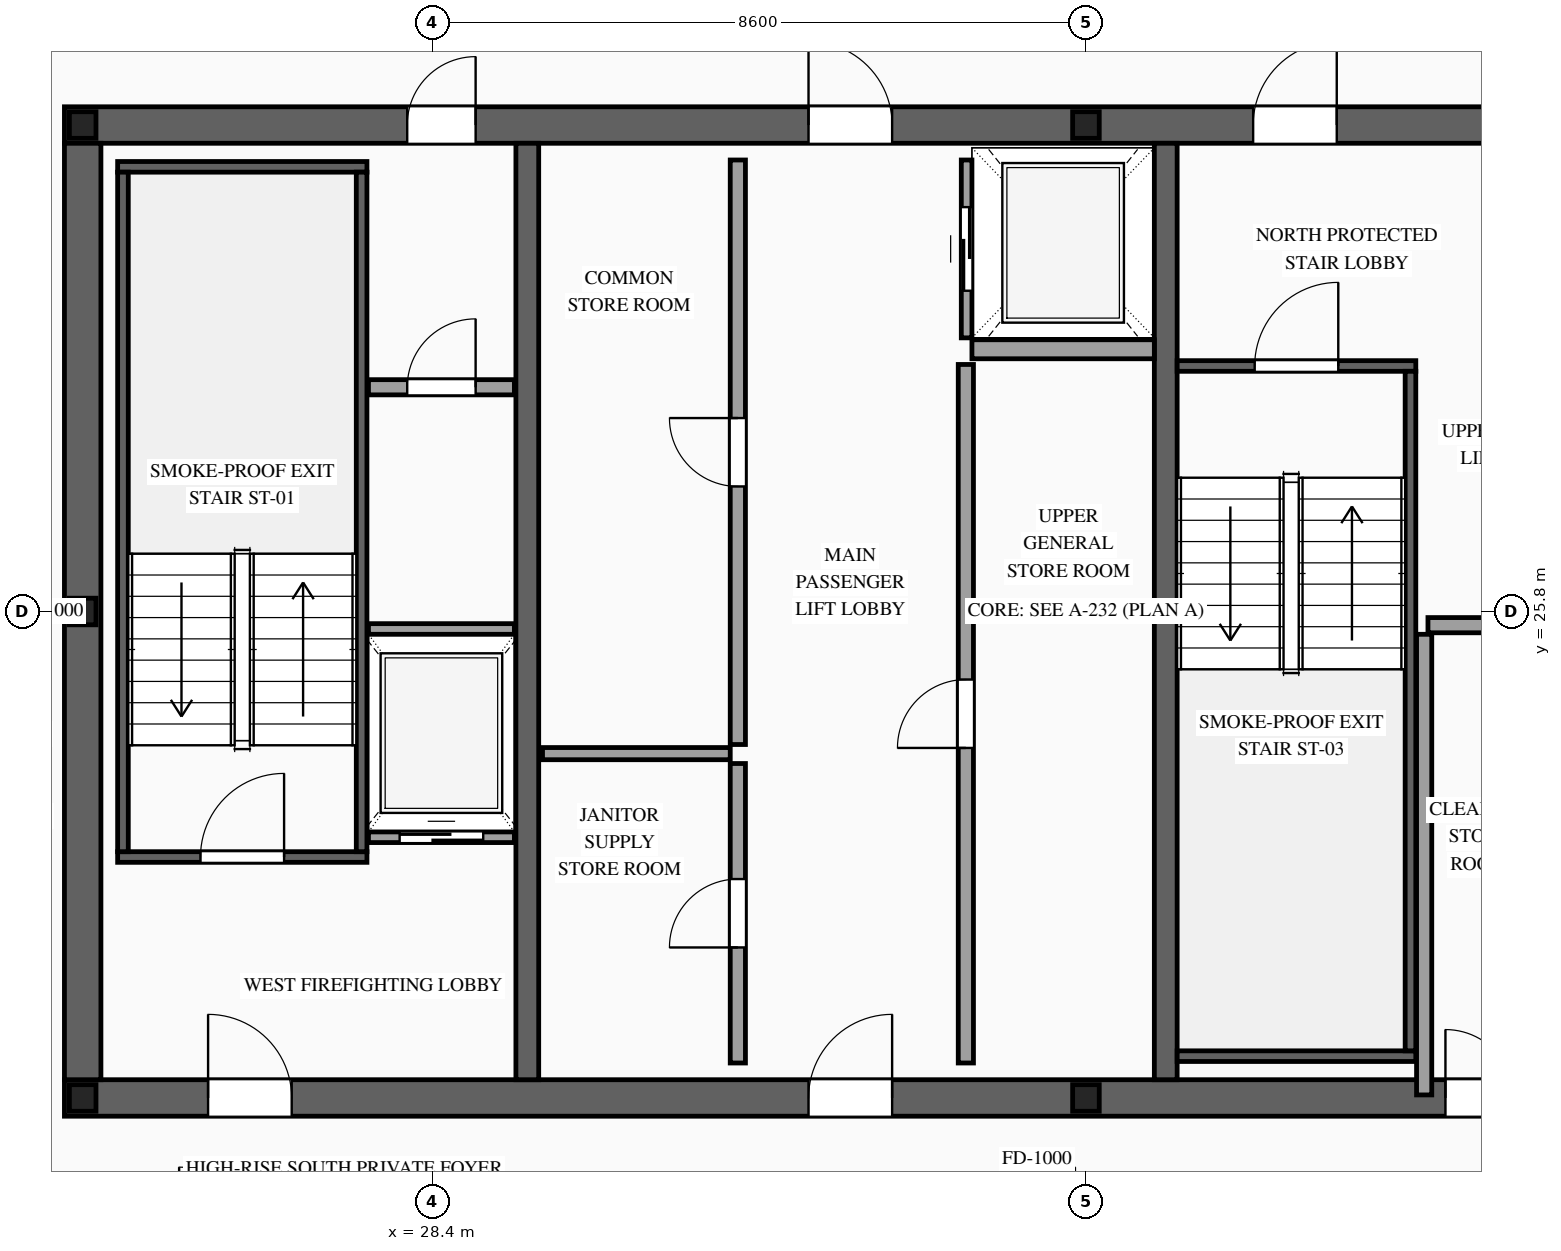
"""IFC4 building model, lengths in metres.
Left out: names, types, materials, properties, quantities, classifications, styles, units other than length and angle.
Written with IfcOpenShell. Run it as: python <this file> out.ifc"""

import sys

from ifc_helpers import new_model, si_unit, direction, frame, frame_2d, origin, origin_2d, place, context, subcontext, project, spatial, rectangle, i_section, extrude, source, transform, mapped, element, fill, save


model = new_model("IFC4")
c1 = context("Model", 3, precision=1e-05, world=origin(), true_north=direction((0.0, 1.0)))
c2 = subcontext(c1, "Body", "Model", "MODEL_VIEW")
j1 = project(units=[si_unit("LENGTHUNIT", "METRE"), si_unit("PLANEANGLEUNIT", "RADIAN")], contexts=[c1])
p1 = place(None, origin())
s1 = spatial("IfcSite", under=j1, at=p1, CompositionType="ELEMENT")
p2 = place(p1, origin())
s2 = spatial("IfcBuilding", under=s1, at=p2, CompositionType="ELEMENT")
p3 = place(p2, frame((0.0, 0.0, 289.1)))
s3 = spatial("IfcBuildingStorey", under=s2, at=p3, CompositionType="ELEMENT", Elevation=289.1)
p4 = place(p3, frame((23.56, 19.4, 0.0), z_axis=(0.0, 0.0, 1.0), x_axis=(1.0, 0.0, 0.0)))
e1 = element("IfcWall", 1, at=p4, inside=s3, PredefinedType="SHEAR", context=c2, shape_type="SweptSolid", body=[
    extrude(rectangle(XDim=26.88, YDim=0.48, at=frame_2d((13.44, 0.0))), origin(), (0.0, 0.0, 1.0), 3.5),
])
p5 = place(p4, frame((1.89, 0.0, 0.0)))
e2 = element("IfcOpeningElement", 2, at=p5, cuts=e1, PredefinedType="OPENING", context=c2, shape_type="SweptSolid", body=[
    extrude(rectangle(XDim=1.1, YDim=2.2, at=frame_2d((0.55, 1.1))), frame((0.0, 0.255, 0.0), z_axis=(0.0, -1.0, 0.0), x_axis=(1.0, 0.0, 0.0)), (0.0, 0.0, 1.0), 0.51),
])
p6 = place(p4, frame((9.79, 0.0, 0.0)))
e3 = element("IfcOpeningElement", 3, at=p6, cuts=e1, PredefinedType="OPENING", context=c2, shape_type="SweptSolid", body=[
    extrude(rectangle(XDim=1.1, YDim=2.2, at=frame_2d((0.55, 1.1))), frame((0.0, 0.255, 0.0), z_axis=(0.0, -1.0, 0.0), x_axis=(1.0, 0.0, 0.0)), (0.0, 0.0, 1.0), 0.51),
])
p7 = place(p4, frame((22.99, 0.0, 0.0)))
e4 = element("IfcOpeningElement", 4, at=p7, cuts=e1, PredefinedType="OPENING", context=c2, shape_type="SweptSolid", body=[
    extrude(rectangle(XDim=1.1, YDim=2.2, at=frame_2d((0.55, 1.1))), frame((0.0, 0.255, 0.0), z_axis=(0.0, -1.0, 0.0), x_axis=(1.0, 0.0, 0.0)), (0.0, 0.0, 1.0), 0.51),
])
p8 = place(p4, frame((19.61, 0.0, 0.0)))
e5 = element("IfcOpeningElement", 5, at=p8, cuts=e1, PredefinedType="OPENING", context=c2, shape_type="SweptSolid", body=[
    extrude(rectangle(XDim=0.9, YDim=2.15, at=frame_2d((0.45, 1.075))), frame((0.0, 0.255, 0.0), z_axis=(0.0, -1.0, 0.0), x_axis=(1.0, 0.0, 0.0)), (0.0, 0.0, 1.0), 0.51),
])
p9 = place(p4, frame((18.17, 0.0, 0.0)))
e6 = element("IfcOpeningElement", 6, at=p9, cuts=e1, PredefinedType="OPENING", context=c2, shape_type="SweptSolid", body=[
    extrude(rectangle(XDim=0.9, YDim=2.15, at=frame_2d((0.45, 1.075))), frame((0.0, 0.255, 0.0), z_axis=(0.0, -1.0, 0.0), x_axis=(1.0, 0.0, 0.0)), (0.0, 0.0, 1.0), 0.51),
])
p10 = place(p3, frame((23.56, 32.2, 0.0), z_axis=(0.0, 0.0, 1.0), x_axis=(1.0, 0.0, 0.0)))
e7 = element("IfcWall", 7, at=p10, inside=s3, PredefinedType="SHEAR", context=c2, shape_type="SweptSolid", body=[
    extrude(rectangle(XDim=26.88, YDim=0.48, at=frame_2d((13.44, 0.0))), origin(), (0.0, 0.0, 1.0), 3.5),
])
p11 = place(p10, frame((4.51, 0.0, 0.0)))
e8 = element("IfcOpeningElement", 8, at=p11, cuts=e7, PredefinedType="OPENING", context=c2, shape_type="SweptSolid", body=[
    extrude(rectangle(XDim=0.9, YDim=2.15, at=frame_2d((0.45, 1.075))), frame((0.0, 0.255, 0.0), z_axis=(0.0, -1.0, 0.0), x_axis=(1.0, 0.0, 0.0)), (0.0, 0.0, 1.0), 0.51),
])
p12 = place(p10, frame((9.79, 0.0, 0.0)))
e9 = element("IfcOpeningElement", 9, at=p12, cuts=e7, PredefinedType="OPENING", context=c2, shape_type="SweptSolid", body=[
    extrude(rectangle(XDim=1.1, YDim=2.2, at=frame_2d((0.55, 1.1))), frame((0.0, 0.255, 0.0), z_axis=(0.0, -1.0, 0.0), x_axis=(1.0, 0.0, 0.0)), (0.0, 0.0, 1.0), 0.51),
])
p13 = place(p10, frame((15.64, 0.0, 0.0)))
e10 = element("IfcOpeningElement", 10, at=p13, cuts=e7, PredefinedType="OPENING", context=c2, shape_type="SweptSolid", body=[
    extrude(rectangle(XDim=1.1, YDim=2.2, at=frame_2d((0.55, 1.1))), frame((0.0, 0.255, 0.0), z_axis=(0.0, -1.0, 0.0), x_axis=(1.0, 0.0, 0.0)), (0.0, 0.0, 1.0), 0.51),
])
p14 = place(p10, frame((18.74, 0.0, 0.0)))
e11 = element("IfcOpeningElement", 11, at=p14, cuts=e7, PredefinedType="OPENING", context=c2, shape_type="SweptSolid", body=[
    extrude(rectangle(XDim=1.1, YDim=2.2, at=frame_2d((0.55, 1.1))), frame((0.0, 0.255, 0.0), z_axis=(0.0, -1.0, 0.0), x_axis=(1.0, 0.0, 0.0)), (0.0, 0.0, 1.0), 0.51),
])
m1 = source(origin(), c2, "Body", "SweptSolid", [
    extrude(rectangle(XDim=12.32, YDim=0.48, at=frame_2d((6.16, 0.0))), origin(), (0.0, 0.0, 1.0), 3.5),
])
p15 = place(p3, frame((23.8, 19.64, 0.0), z_axis=(0.0, 0.0, 1.0), x_axis=(0.0, 1.0, 0.0)))
e12 = element("IfcWall", 12, at=p15, inside=s3, PredefinedType="SHEAR", context=c2, shape_type="MappedRepresentation", body=[
    mapped(m1, transform((0.0, 0.0, 0.0), scale=1.0)),
])
m2 = source(origin(), c2, "Body", "SweptSolid", [
    extrude(rectangle(XDim=12.32, YDim=0.3, at=frame_2d((6.16, 0.0))), origin(), (0.0, 0.0, 1.0), 3.5),
])
for number, where, z_axis, x_axis in (
    (13, (29.65, 19.64, 0.0), (0.0, 0.0, 1.0), (0.0, 1.0, 0.0)),
    (14, (38.05, 19.64, 0.0), (0.0, 0.0, 1.0), (0.0, 1.0, 0.0)),
):
    element("IfcWall", number, at=place(p3, frame(where, z_axis=z_axis, x_axis=x_axis)), inside=s3, PredefinedType="SOLIDWALL", context=c2, shape_type="MappedRepresentation", body=[
        mapped(m2, transform((0.0, 0.0, 0.0), scale=1.0)),
    ])
m3 = source(origin(), c2, "Body", "SweptSolid", [
    extrude(i_section(OverallWidth=0.35, OverallDepth=0.35, WebThickness=0.012, FlangeThickness=0.019, at=origin_2d()), origin(), (0.0, 0.0, 1.0), 3.5),
])
for number, where, z_axis, x_axis in (
    (15, (23.8, 19.4, 0.0), (0.0, 0.0, 1.0), (1.0, 0.0, 0.0)),
    (16, (37.0, 19.4, 0.0), (0.0, 0.0, 1.0), (1.0, 0.0, 0.0)),
    (17, (23.8, 25.8, 0.0), (0.0, 0.0, 1.0), (1.0, 0.0, 0.0)),
    (18, (23.8, 32.2, 0.0), (0.0, 0.0, 1.0), (1.0, 0.0, 0.0)),
    (19, (37.0, 32.2, 0.0), (0.0, 0.0, 1.0), (1.0, 0.0, 0.0)),
):
    element("IfcColumn", number, at=place(p3, frame(where, z_axis=z_axis, x_axis=x_axis)), inside=s3, PredefinedType="COLUMN", context=c2, shape_type="MappedRepresentation", body=[
        mapped(m3, transform((0.0, 0.0, 0.0), scale=1.0)),
    ])
p16 = place(p3, frame((27.56, 22.83, 0.0), z_axis=(0.0, 0.0, 1.0), x_axis=(1.0, 0.0, 0.0)))
e20 = element("IfcWall", 20, at=p16, inside=s3, PredefinedType="SOLIDWALL", context=c2, shape_type="SweptSolid", body=[
    extrude(rectangle(XDim=1.92, YDim=0.14, at=frame_2d((0.96, 0.0))), origin(), (0.0, 0.0, 1.0), 3.28),
])
p17 = place(p16, frame((0.41, 0.0, 0.0)))
e21 = element("IfcOpeningElement", 21, at=p17, cuts=e20, PredefinedType="OPENING", context=c2, shape_type="SweptSolid", body=[
    extrude(rectangle(XDim=1.1, YDim=2.2, at=frame_2d((0.55, 1.1))), frame((0.0, 0.085, 0.0), z_axis=(0.0, -1.0, 0.0), x_axis=(1.0, 0.0, 0.0)), (0.0, 0.0, 1.0), 0.17),
])
m4 = source(origin(), c2, "Body", "SweptSolid", [
    extrude(rectangle(XDim=1.92, YDim=0.14, at=frame_2d((0.96, 0.0))), origin(), (0.0, 0.0, 1.0), 3.28),
])
p18 = place(p3, frame((27.56, 25.57, 0.0), z_axis=(0.0, 0.0, 1.0), x_axis=(1.0, 0.0, 0.0)))
e22 = element("IfcWall", 22, at=p18, inside=s3, PredefinedType="SOLIDWALL", context=c2, shape_type="MappedRepresentation", body=[
    mapped(m4, transform((0.0, 0.0, 0.0), scale=1.0)),
])
p19 = place(p3, frame((35.43, 29.4, 0.0), z_axis=(0.0, 0.0, 1.0), x_axis=(0.0, 1.0, 0.0)))
e23 = element("IfcWall", 23, at=p19, inside=s3, PredefinedType="SOLIDWALL", context=c2, shape_type="SweptSolid", body=[
    extrude(rectangle(XDim=2.34, YDim=0.14, at=frame_2d((1.17, 0.0))), origin(), (0.0, 0.0, 1.0), 3.28),
])
p20 = place(p19, frame((0.62, 0.0, 0.0)))
e24 = element("IfcOpeningElement", 24, at=p20, cuts=e23, PredefinedType="OPENING", context=c2, shape_type="SweptSolid", body=[
    extrude(rectangle(XDim=1.1, YDim=2.2, at=frame_2d((0.55, 1.1))), frame((0.0, 0.085, 0.0), z_axis=(0.0, -1.0, 0.0), x_axis=(1.0, 0.0, 0.0)), (0.0, 0.0, 1.0), 0.17),
])
m5 = source(origin(), c2, "Body", "SweptSolid", [
    extrude(rectangle(XDim=2.4, YDim=0.25, at=frame_2d((1.2, 0.0))), origin(), (0.0, 0.0, 1.0), 3.28),
])
p21 = place(p3, frame((35.5, 29.25, 0.0), z_axis=(0.0, 0.0, 1.0), x_axis=(1.0, 0.0, 0.0)))
e25 = element("IfcWall", 25, at=p21, inside=s3, PredefinedType="SOLIDWALL", context=c2, shape_type="MappedRepresentation", body=[
    mapped(m5, transform((0.0, 0.0, 0.0), scale=1.0)),
])
p22 = place(p3, frame((24.26, 22.57, 0.0), z_axis=(0.0, 0.0, 1.0), x_axis=(1.0, 0.0, 0.0)))
e26 = element("IfcWall", 26, at=p22, inside=s3, PredefinedType="SOLIDWALL", context=c2, shape_type="SweptSolid", body=[
    extrude(rectangle(XDim=3.28, YDim=0.14, at=frame_2d((1.64, 0.0))), origin(), (0.0, 0.0, 1.0), 3.28),
])
p23 = place(p22, frame((1.09, 0.0, 0.0)))
e27 = element("IfcOpeningElement", 27, at=p23, cuts=e26, PredefinedType="OPENING", context=c2, shape_type="SweptSolid", body=[
    extrude(rectangle(XDim=1.1, YDim=2.2, at=frame_2d((0.55, 1.1))), frame((0.0, 0.085, 0.0), z_axis=(0.0, -1.0, 0.0), x_axis=(1.0, 0.0, 0.0)), (0.0, 0.0, 1.0), 0.17),
])
m6 = source(origin(), c2, "Body", "SweptSolid", [
    extrude(rectangle(XDim=3.28, YDim=0.14, at=frame_2d((1.64, 0.0))), origin(), (0.0, 0.0, 1.0), 3.28),
])
p24 = place(p3, frame((24.26, 31.65, 0.0), z_axis=(0.0, 0.0, 1.0), x_axis=(1.0, 0.0, 0.0)))
e28 = element("IfcWall", 28, at=p24, inside=s3, PredefinedType="SOLIDWALL", context=c2, shape_type="MappedRepresentation", body=[
    mapped(m6, transform((0.0, 0.0, 0.0), scale=1.0)),
])
m7 = source(origin(), c2, "Body", "SweptSolid", [
    extrude(rectangle(XDim=8.94, YDim=0.14, at=frame_2d((4.47, 0.0))), origin(), (0.0, 0.0, 1.0), 3.28),
])
for number, where, z_axis, x_axis in (
    (29, (24.33, 22.64, 0.0), (0.0, 0.0, 1.0), (0.0, 1.0, 0.0)),
    (30, (27.47, 22.64, 0.0), (0.0, 0.0, 1.0), (0.0, 1.0, 0.0)),
):
    element("IfcWall", number, at=place(p3, frame(where, z_axis=z_axis, x_axis=x_axis)), inside=s3, PredefinedType="SOLIDWALL", context=c2, shape_type="MappedRepresentation", body=[
        mapped(m7, transform((0.0, 0.0, 0.0), scale=1.0)),
    ])
p25 = place(p3, frame((38.2, 29.03, 0.0), z_axis=(0.0, 0.0, 1.0), x_axis=(1.0, 0.0, 0.0)))
e31 = element("IfcWall", 31, at=p25, inside=s3, PredefinedType="SOLIDWALL", context=c2, shape_type="SweptSolid", body=[
    extrude(rectangle(XDim=3.14, YDim=0.14, at=frame_2d((1.57, 0.0))), origin(), (0.0, 0.0, 1.0), 3.28),
])
p26 = place(p25, frame((1.02, 0.0, 0.0)))
e32 = element("IfcOpeningElement", 32, at=p26, cuts=e31, PredefinedType="OPENING", context=c2, shape_type="SweptSolid", body=[
    extrude(rectangle(XDim=1.1, YDim=2.2, at=frame_2d((0.55, 1.1))), frame((0.0, 0.085, 0.0), z_axis=(0.0, -1.0, 0.0), x_axis=(1.0, 0.0, 0.0)), (0.0, 0.0, 1.0), 0.17),
])
m8 = source(origin(), c2, "Body", "SweptSolid", [
    extrude(rectangle(XDim=3.14, YDim=0.14, at=frame_2d((1.57, 0.0))), origin(), (0.0, 0.0, 1.0), 3.28),
])
p27 = place(p3, frame((38.2, 19.95, 0.0), z_axis=(0.0, 0.0, 1.0), x_axis=(1.0, 0.0, 0.0)))
e33 = element("IfcWall", 33, at=p27, inside=s3, PredefinedType="SOLIDWALL", context=c2, shape_type="MappedRepresentation", body=[
    mapped(m8, transform((0.0, 0.0, 0.0), scale=1.0)),
])
m9 = source(origin(), c2, "Body", "SweptSolid", [
    extrude(rectangle(XDim=8.94, YDim=0.14, at=frame_2d((4.47, 0.0))), origin(), (0.0, 0.0, 1.0), 3.28),
])
p28 = place(p3, frame((41.27, 20.02, 0.0), z_axis=(0.0, 0.0, 1.0), x_axis=(0.0, 1.0, 0.0)))
e34 = element("IfcWall", 34, at=p28, inside=s3, PredefinedType="SOLIDWALL", context=c2, shape_type="MappedRepresentation", body=[
    mapped(m9, transform((0.0, 0.0, 0.0), scale=1.0)),
])
p29 = place(p3, frame((27.56, 28.75, 0.0), z_axis=(0.0, 0.0, 1.0), x_axis=(1.0, 0.0, 0.0)))
e35 = element("IfcWall", 35, at=p29, inside=s3, PredefinedType="PARTITIONING", context=c2, shape_type="SweptSolid", body=[
    extrude(rectangle(XDim=1.92, YDim=0.2, at=frame_2d((0.96, 0.0))), origin(), (0.0, 0.0, 1.0), 3.28),
])
p30 = place(p29, frame((0.51, 0.0, 0.0)))
e36 = element("IfcOpeningElement", 36, at=p30, cuts=e35, PredefinedType="OPENING", context=c2, shape_type="SweptSolid", body=[
    extrude(rectangle(XDim=0.9, YDim=2.15, at=frame_2d((0.45, 1.075))), frame((0.0, 0.115, 0.0), z_axis=(0.0, -1.0, 0.0), x_axis=(1.0, 0.0, 0.0)), (0.0, 0.0, 1.0), 0.23),
])
p31 = place(p3, frame((32.42, 19.86, 0.0), z_axis=(0.0, 0.0, 1.0), x_axis=(0.0, 1.0, 0.0)))
e37 = element("IfcWall", 37, at=p31, inside=s3, PredefinedType="PARTITIONING", context=c2, shape_type="SweptSolid", body=[
    extrude(rectangle(XDim=3.94, YDim=0.2, at=frame_2d((1.97, 0.0))), origin(), (0.0, 0.0, 1.0), 3.28),
])
p32 = place(p31, frame((1.52, 0.0, 0.0)))
e38 = element("IfcOpeningElement", 38, at=p32, cuts=e37, PredefinedType="OPENING", context=c2, shape_type="SweptSolid", body=[
    extrude(rectangle(XDim=0.9, YDim=2.15, at=frame_2d((0.45, 1.075))), frame((0.0, 0.115, 0.0), z_axis=(0.0, -1.0, 0.0), x_axis=(1.0, 0.0, 0.0)), (0.0, 0.0, 1.0), 0.23),
])
p33 = place(p3, frame((32.42, 24.05, 0.0), z_axis=(0.0, 0.0, 1.0), x_axis=(0.0, 1.0, 0.0)))
e39 = element("IfcWall", 39, at=p33, inside=s3, PredefinedType="PARTITIONING", context=c2, shape_type="SweptSolid", body=[
    extrude(rectangle(XDim=7.69, YDim=0.2, at=frame_2d((3.845, 0.0))), origin(), (0.0, 0.0, 1.0), 3.28),
])
p34 = place(p33, frame((3.395, 0.0, 0.0)))
e40 = element("IfcOpeningElement", 40, at=p34, cuts=e39, PredefinedType="OPENING", context=c2, shape_type="SweptSolid", body=[
    extrude(rectangle(XDim=0.9, YDim=2.15, at=frame_2d((0.45, 1.075))), frame((0.0, 0.115, 0.0), z_axis=(0.0, -1.0, 0.0), x_axis=(1.0, 0.0, 0.0)), (0.0, 0.0, 1.0), 0.23),
])
m10 = source(origin(), c2, "Body", "SweptSolid", [
    extrude(rectangle(XDim=2.47, YDim=0.16, at=frame_2d((1.235, 0.0))), origin(), (0.0, 0.0, 1.0), 3.28),
])
p35 = place(p3, frame((29.85, 23.93, 0.0), z_axis=(0.0, 0.0, 1.0), x_axis=(1.0, 0.0, 0.0)))
e41 = element("IfcWall", 41, at=p35, inside=s3, PredefinedType="PARTITIONING", context=c2, shape_type="MappedRepresentation", body=[
    mapped(m10, transform((0.0, 0.0, 0.0), scale=1.0)),
])
p36 = place(p3, frame((35.42, 19.86, 0.0), z_axis=(0.0, 0.0, 1.0), x_axis=(0.0, 1.0, 0.0)))
e42 = element("IfcWall", 42, at=p36, inside=s3, PredefinedType="PARTITIONING", context=c2, shape_type="SweptSolid", body=[
    extrude(rectangle(XDim=9.19, YDim=0.2, at=frame_2d((4.595, 0.0))), origin(), (0.0, 0.0, 1.0), 3.28),
])
p37 = place(p36, frame((4.145, 0.0, 0.0)))
e43 = element("IfcOpeningElement", 43, at=p37, cuts=e42, PredefinedType="OPENING", context=c2, shape_type="SweptSolid", body=[
    extrude(rectangle(XDim=0.9, YDim=2.15, at=frame_2d((0.45, 1.075))), frame((0.0, 0.115, 0.0), z_axis=(0.0, -1.0, 0.0), x_axis=(1.0, 0.0, 0.0)), (0.0, 0.0, 1.0), 0.23),
])
m11 = source(origin(), c2, "Body", "SweptSolid", [
    extrude(rectangle(XDim=6.06, YDim=0.2, at=frame_2d((3.03, 0.0))), origin(), (0.0, 0.0, 1.0), 3.28),
])
p38 = place(p3, frame((41.45, 19.44, 0.0), z_axis=(0.0, 0.0, 1.0), x_axis=(0.0, 1.0, 0.0)))
e44 = element("IfcWall", 44, at=p38, inside=s3, PredefinedType="PARTITIONING", context=c2, shape_type="MappedRepresentation", body=[
    mapped(m11, transform((0.0, 0.0, 0.0), scale=1.0)),
])
m12 = source(origin(), c2, "Body", "SweptSolid", [
    extrude(rectangle(XDim=1.35, YDim=0.2, at=frame_2d((0.675, 0.0))), origin(), (0.0, 0.0, 1.0), 3.28),
])
p39 = place(p3, frame((41.5, 25.62, 0.0), z_axis=(0.0, 0.0, 1.0), x_axis=(1.0, 0.0, 0.0)))
e45 = element("IfcWall", 45, at=p39, inside=s3, PredefinedType="PARTITIONING", context=c2, shape_type="MappedRepresentation", body=[
    mapped(m12, transform((0.0, 0.0, 0.0), scale=1.0)),
])
m13 = source(origin(), c2, "Body", "SweptSolid", [
    extrude(rectangle(XDim=1.1, YDim=2.2, at=frame_2d((0.55, 1.1))), frame((0.0, 0.025, 0.0), z_axis=(0.0, -1.0, 0.0), x_axis=(1.0, 0.0, 0.0)), (0.0, 0.0, 1.0), 0.05),
])
p40 = place(p17, origin())
e46 = element("IfcDoor", 46, at=p40, inside=s3, OperationType="SLIDING_TO_LEFT", PredefinedType="DOOR", context=c2, shape_type="MappedRepresentation", body=[
    mapped(m13, transform((0.0, 0.0, 0.0), scale=1.0)),
])
fill(e21, e46)
p41 = place(p20, origin())
e47 = element("IfcDoor", 47, at=p41, inside=s3, OperationType="SLIDING_TO_RIGHT", PredefinedType="DOOR", context=c2, shape_type="MappedRepresentation", body=[
    mapped(m13, transform((0.0, 0.0, 0.0), scale=1.0)),
])
fill(e24, e47)
m14 = source(origin(), c2, "Body", "SweptSolid", [
    extrude(rectangle(XDim=1.1, YDim=2.2, at=frame_2d((0.55, 1.1))), frame((0.0, 0.025, 0.0), z_axis=(0.0, -1.0, 0.0), x_axis=(1.0, 0.0, 0.0)), (0.0, 0.0, 1.0), 0.05),
])
p42 = place(p23, origin())
e48 = element("IfcDoor", 48, at=p42, inside=s3, OperationType="SINGLE_SWING_RIGHT", PredefinedType="DOOR", context=c2, shape_type="MappedRepresentation", body=[
    mapped(m14, transform((0.0, 0.0, 0.0), scale=1.0)),
])
fill(e27, e48)
p43 = place(p26, origin())
e49 = element("IfcDoor", 49, at=p43, inside=s3, OperationType="SINGLE_SWING_RIGHT", PredefinedType="DOOR", context=c2, shape_type="MappedRepresentation", body=[
    mapped(m14, transform((0.0, 0.0, 0.0), scale=1.0)),
])
fill(e32, e49)
p44 = place(p5, origin())
e50 = element("IfcDoor", 50, at=p44, inside=s3, OperationType="SINGLE_SWING_LEFT", PredefinedType="DOOR", context=c2, shape_type="MappedRepresentation", body=[
    mapped(m14, transform((0.0, 0.0, 0.0), scale=1.0)),
])
fill(e2, e50)
p45 = place(p6, origin())
e51 = element("IfcDoor", 51, at=p45, inside=s3, OperationType="SINGLE_SWING_RIGHT", PredefinedType="DOOR", context=c2, shape_type="MappedRepresentation", body=[
    mapped(m14, transform((0.0, 0.0, 0.0), scale=1.0)),
])
fill(e3, e51)
m15 = source(origin(), c2, "Body", "SweptSolid", [
    extrude(rectangle(XDim=0.9, YDim=2.15, at=frame_2d((0.45, 1.075))), frame((0.0, 0.025, 0.0), z_axis=(0.0, -1.0, 0.0), x_axis=(1.0, 0.0, 0.0)), (0.0, 0.0, 1.0), 0.05),
])
p46 = place(p11, origin())
e52 = element("IfcDoor", 52, at=p46, inside=s3, OperationType="SINGLE_SWING_RIGHT", PredefinedType="DOOR", context=c2, shape_type="MappedRepresentation", body=[
    mapped(m15, transform((0.0, 0.0, 0.0), scale=1.0)),
])
fill(e8, e52)
p47 = place(p12, origin())
e53 = element("IfcDoor", 53, at=p47, inside=s3, OperationType="SINGLE_SWING_LEFT", PredefinedType="DOOR", context=c2, shape_type="MappedRepresentation", body=[
    mapped(m14, transform((0.0, 0.0, 0.0), scale=1.0)),
])
fill(e9, e53)
p48 = place(p13, origin())
e54 = element("IfcDoor", 54, at=p48, inside=s3, OperationType="SINGLE_SWING_RIGHT", PredefinedType="DOOR", context=c2, shape_type="MappedRepresentation", body=[
    mapped(m14, transform((0.0, 0.0, 0.0), scale=1.0)),
])
fill(e10, e54)
p49 = place(p30, origin())
e55 = element("IfcDoor", 55, at=p49, inside=s3, OperationType="SINGLE_SWING_RIGHT", PredefinedType="DOOR", context=c2, shape_type="MappedRepresentation", body=[
    mapped(m15, transform((0.0, 0.0, 0.0), scale=1.0)),
])
fill(e36, e55)
p50 = place(p32, origin())
e56 = element("IfcDoor", 56, at=p50, inside=s3, OperationType="SINGLE_SWING_LEFT", PredefinedType="DOOR", context=c2, shape_type="MappedRepresentation", body=[
    mapped(m15, transform((0.0, 0.0, 0.0), scale=1.0)),
])
fill(e38, e56)
p51 = place(p34, origin())
e57 = element("IfcDoor", 57, at=p51, inside=s3, OperationType="SINGLE_SWING_RIGHT", PredefinedType="DOOR", context=c2, shape_type="MappedRepresentation", body=[
    mapped(m15, transform((0.0, 0.0, 0.0), scale=1.0)),
])
fill(e40, e57)
p52 = place(p37, origin())
e58 = element("IfcDoor", 58, at=p52, inside=s3, OperationType="SINGLE_SWING_LEFT", PredefinedType="DOOR", context=c2, shape_type="MappedRepresentation", body=[
    mapped(m15, transform((0.0, 0.0, 0.0), scale=1.0)),
])
fill(e43, e58)
p53 = place(p9, origin())
e59 = element("IfcDoor", 59, at=p53, inside=s3, OperationType="SINGLE_SWING_LEFT", PredefinedType="DOOR", context=c2, shape_type="MappedRepresentation", body=[
    mapped(m15, transform((0.0, 0.0, 0.0), scale=1.0)),
])
fill(e6, e59)
save(model, sys.argv[1])
